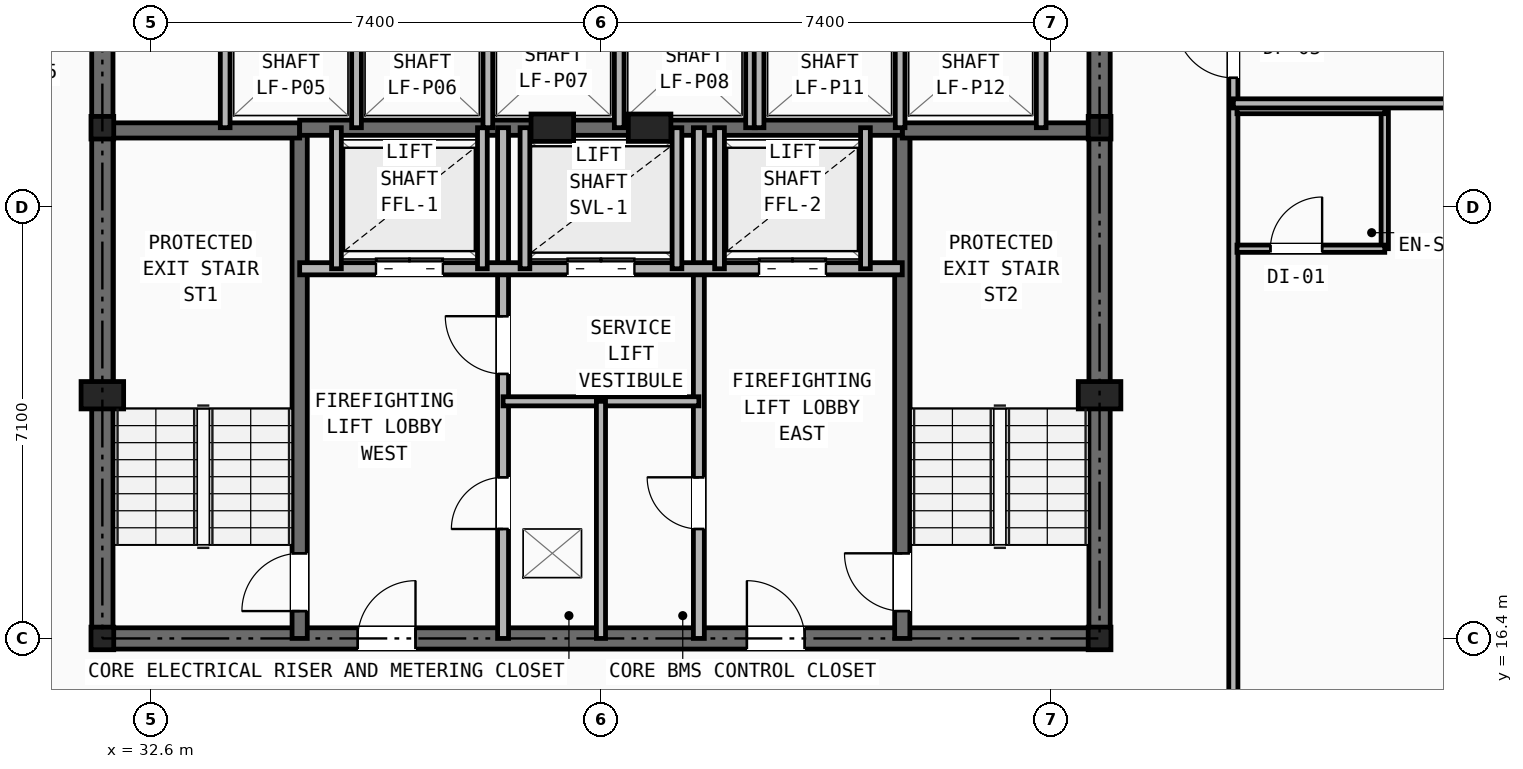
"""IFC4 building model, lengths in metres.
Left out: names, types, materials, properties, quantities, classifications, styles, units other than length and angle.
Written with IfcOpenShell. Run it as: python <this file> out.ifc"""

import sys

from ifc_helpers import new_model, si_unit, direction, frame, frame_2d, origin, origin_2d, place, context, subcontext, project, spatial, rectangle, i_section, extrude, element, fill, save


model = new_model("IFC4")
c1 = context("Model", 3, precision=1e-05, world=origin(), true_north=direction((0.0, 1.0)))
c2 = subcontext(c1, "Body", "Model", "MODEL_VIEW")
j1 = project(units=[si_unit("LENGTHUNIT", "METRE"), si_unit("PLANEANGLEUNIT", "RADIAN")], contexts=[c1])
p1 = place(None, origin())
s1 = spatial("IfcSite", under=j1, at=p1, CompositionType="ELEMENT")
p2 = place(p1, origin())
s2 = spatial("IfcBuilding", under=s1, at=p2, CompositionType="ELEMENT")
p3 = place(p2, frame((0.0, 0.0, 56.0)))
s3 = spatial("IfcBuildingStorey", under=s2, at=p3, CompositionType="ELEMENT", Elevation=56.0)
for number, where, z_axis, x_axis in (
    (1, (31.8, 16.4, 0.0), (0.0, 0.0, 1.0), (1.0, 0.0, 0.0)),
    (2, (48.2, 16.4, 0.0), (0.0, 0.0, 1.0), (1.0, 0.0, 0.0)),
    (3, (31.8, 24.8, 0.0), (0.0, 0.0, 1.0), (1.0, 0.0, 0.0)),
    (4, (48.2, 24.8, 0.0), (0.0, 0.0, 1.0), (1.0, 0.0, 0.0)),
):
    element("IfcColumn", number, at=place(p3, frame(where, z_axis=z_axis, x_axis=x_axis)), inside=s3, PredefinedType="COLUMN", context=c2, shape_type="SweptSolid", body=[
        extrude(i_section(OverallWidth=0.374, OverallDepth=0.372, WebThickness=0.016, FlangeThickness=0.026, at=origin_2d()), origin(), (0.0, 0.0, 1.0), 3.2),
    ])
for number, where, z_axis, x_axis in (
    (5, (31.8, 20.4, 0.0), (0.0, 0.0, 1.0), (1.0, 0.0, 0.0)),
    (6, (48.2, 20.4, 0.0), (0.0, 0.0, 1.0), (1.0, 0.0, 0.0)),
    (7, (39.2, 24.8, 0.0), (0.0, 0.0, 1.0), (1.0, 0.0, 0.0)),
    (8, (40.8, 24.8, 0.0), (0.0, 0.0, 1.0), (1.0, 0.0, 0.0)),
):
    element("IfcColumn", number, at=place(p3, frame(where, z_axis=z_axis, x_axis=x_axis)), inside=s3, PredefinedType="PILASTER", context=c2, shape_type="SweptSolid", body=[
        extrude(rectangle(XDim=0.7, YDim=0.45, at=origin_2d()), origin(), (0.0, 0.0, 1.0), 3.2),
    ])
p4 = place(p3, frame((31.8, 16.4, 0.0), z_axis=(0.0, 0.0, 1.0), x_axis=(1.0, 0.0, 0.0)))
e9 = element("IfcWall", 9, at=p4, inside=s3, PredefinedType="SHEAR", context=c2, shape_type="SweptSolid", body=[
    extrude(rectangle(XDim=16.4, YDim=0.35, at=frame_2d((8.2, 0.0))), origin(), (0.0, 0.0, 1.0), 2.98),
])
p5 = place(p4, frame((4.2, 0.0, 0.0)))
e10 = element("IfcOpeningElement", 10, at=p5, cuts=e9, PredefinedType="OPENING", context=c2, shape_type="SweptSolid", body=[
    extrude(rectangle(XDim=0.95, YDim=2.1, at=frame_2d((0.475, 1.05))), frame((0.0, 0.185, 0.0), z_axis=(0.0, -1.0, 0.0), x_axis=(1.0, 0.0, 0.0)), (0.0, 0.0, 1.0), 0.37),
])
p6 = place(p4, frame((10.6, 0.0, 0.0)))
e11 = element("IfcOpeningElement", 11, at=p6, cuts=e9, PredefinedType="OPENING", context=c2, shape_type="SweptSolid", body=[
    extrude(rectangle(XDim=0.95, YDim=2.1, at=frame_2d((0.475, 1.05))), frame((0.0, 0.185, 0.0), z_axis=(0.0, -1.0, 0.0), x_axis=(1.0, 0.0, 0.0)), (0.0, 0.0, 1.0), 0.37),
])
p7 = place(p3, frame((31.8, 16.4, 0.0), z_axis=(0.0, 0.0, 1.0), x_axis=(0.0, 1.0, 0.0)))
e12 = element("IfcWall", 12, at=p7, inside=s3, PredefinedType="SHEAR", context=c2, shape_type="SweptSolid", body=[
    extrude(rectangle(XDim=14.8, YDim=0.35, at=frame_2d((7.4, 0.0))), origin(), (0.0, 0.0, 1.0), 2.98),
])
p8 = place(p7, frame((11.0, 0.0, 0.0)))
e13 = element("IfcOpeningElement", 13, at=p8, cuts=e12, PredefinedType="OPENING", context=c2, shape_type="SweptSolid", body=[
    extrude(rectangle(XDim=1.1, YDim=2.15, at=frame_2d((0.55, 1.075))), frame((0.0, 0.185, 0.0), z_axis=(0.0, -1.0, 0.0), x_axis=(1.0, 0.0, 0.0)), (0.0, 0.0, 1.0), 0.37),
])
p9 = place(p3, frame((48.2, 16.4, 0.0), z_axis=(0.0, 0.0, 1.0), x_axis=(0.0, 1.0, 0.0)))
e14 = element("IfcWall", 14, at=p9, inside=s3, PredefinedType="SHEAR", context=c2, shape_type="SweptSolid", body=[
    extrude(rectangle(XDim=14.8, YDim=0.35, at=frame_2d((7.4, 0.0))), origin(), (0.0, 0.0, 1.0), 2.98),
])
p10 = place(p9, frame((11.0, 0.0, 0.0)))
e15 = element("IfcOpeningElement", 15, at=p10, cuts=e14, PredefinedType="OPENING", context=c2, shape_type="SweptSolid", body=[
    extrude(rectangle(XDim=1.1, YDim=2.15, at=frame_2d((0.55, 1.075))), frame((0.0, 0.185, 0.0), z_axis=(0.0, -1.0, 0.0), x_axis=(1.0, 0.0, 0.0)), (0.0, 0.0, 1.0), 0.37),
])
p11 = place(p3, frame((35.045, 16.4, 0.0), z_axis=(0.0, 0.0, 1.0), x_axis=(0.0, 1.0, 0.0)))
e16 = element("IfcWall", 16, at=p11, inside=s3, PredefinedType="SHEAR", context=c2, shape_type="SweptSolid", body=[
    extrude(rectangle(XDim=8.4, YDim=0.25, at=frame_2d((4.2, 0.0))), origin(), (0.0, 0.0, 1.0), 2.98),
])
p12 = place(p11, frame((0.45, 0.0, 0.0)))
e17 = element("IfcOpeningElement", 17, at=p12, cuts=e16, PredefinedType="OPENING", context=c2, shape_type="SweptSolid", body=[
    extrude(rectangle(XDim=0.95, YDim=2.1, at=frame_2d((0.475, 1.05))), frame((0.0, 0.135, 0.0), z_axis=(0.0, -1.0, 0.0), x_axis=(1.0, 0.0, 0.0)), (0.0, 0.0, 1.0), 0.27),
])
p13 = place(p3, frame((31.8, 24.755, 0.0), z_axis=(0.0, 0.0, 1.0), x_axis=(1.0, 0.0, 0.0)))
e18 = element("IfcWall", 18, at=p13, inside=s3, PredefinedType="SHEAR", context=c2, shape_type="SweptSolid", body=[
    extrude(rectangle(XDim=3.245, YDim=0.25, at=frame_2d((1.623, 0.0))), origin(), (0.0, 0.0, 1.0), 2.98),
])
p14 = place(p3, frame((44.955, 16.4, 0.0), z_axis=(0.0, 0.0, 1.0), x_axis=(0.0, 1.0, 0.0)))
e19 = element("IfcWall", 19, at=p14, inside=s3, PredefinedType="SHEAR", context=c2, shape_type="SweptSolid", body=[
    extrude(rectangle(XDim=8.4, YDim=0.25, at=frame_2d((4.2, 0.0))), origin(), (0.0, 0.0, 1.0), 2.98),
])
p15 = place(p14, frame((0.45, 0.0, 0.0)))
e20 = element("IfcOpeningElement", 20, at=p15, cuts=e19, PredefinedType="OPENING", context=c2, shape_type="SweptSolid", body=[
    extrude(rectangle(XDim=0.95, YDim=2.1, at=frame_2d((0.475, 1.05))), frame((0.0, 0.135, 0.0), z_axis=(0.0, -1.0, 0.0), x_axis=(1.0, 0.0, 0.0)), (0.0, 0.0, 1.0), 0.27),
])
p16 = place(p3, frame((44.955, 24.755, 0.0), z_axis=(0.0, 0.0, 1.0), x_axis=(1.0, 0.0, 0.0)))
e21 = element("IfcWall", 21, at=p16, inside=s3, PredefinedType="SHEAR", context=c2, shape_type="SweptSolid", body=[
    extrude(rectangle(XDim=3.245, YDim=0.25, at=frame_2d((1.623, 0.0))), origin(), (0.0, 0.0, 1.0), 2.98),
])
p17 = place(p3, frame((35.045, 24.8, 0.0), z_axis=(0.0, 0.0, 1.0), x_axis=(1.0, 0.0, 0.0)))
e22 = element("IfcWall", 22, at=p17, inside=s3, PredefinedType="SHEAR", context=c2, shape_type="SweptSolid", body=[
    extrude(rectangle(XDim=9.91, YDim=0.25, at=frame_2d((4.955, 0.0))), origin(), (0.0, 0.0, 1.0), 2.98),
])
p18 = place(p3, frame((38.39, 16.4, 0.0), z_axis=(0.0, 0.0, 1.0), x_axis=(0.0, 1.0, 0.0)))
e23 = element("IfcWall", 23, at=p18, inside=s3, PredefinedType="PARTITIONING", context=c2, shape_type="SweptSolid", body=[
    extrude(rectangle(XDim=8.4, YDim=0.18, at=frame_2d((4.2, 0.0))), origin(), (0.0, 0.0, 1.0), 2.708),
])
p19 = place(p18, frame((1.8, 0.0, 0.0)))
e24 = element("IfcOpeningElement", 24, at=p19, cuts=e23, PredefinedType="OPENING", context=c2, shape_type="SweptSolid", body=[
    extrude(rectangle(XDim=0.85, YDim=2.05, at=frame_2d((0.425, 1.025))), frame((0.0, 0.1, 0.0), z_axis=(0.0, -1.0, 0.0), x_axis=(1.0, 0.0, 0.0)), (0.0, 0.0, 1.0), 0.2),
])
p20 = place(p18, frame((4.35, 0.0, 0.0)))
e25 = element("IfcOpeningElement", 25, at=p20, cuts=e23, PredefinedType="OPENING", context=c2, shape_type="SweptSolid", body=[
    extrude(rectangle(XDim=0.95, YDim=2.1, at=frame_2d((0.475, 1.05))), frame((0.0, 0.1, 0.0), z_axis=(0.0, -1.0, 0.0), x_axis=(1.0, 0.0, 0.0)), (0.0, 0.0, 1.0), 0.2),
])
p21 = place(p3, frame((41.61, 16.4, 0.0), z_axis=(0.0, 0.0, 1.0), x_axis=(0.0, 1.0, 0.0)))
e26 = element("IfcWall", 26, at=p21, inside=s3, PredefinedType="PARTITIONING", context=c2, shape_type="SweptSolid", body=[
    extrude(rectangle(XDim=8.4, YDim=0.18, at=frame_2d((4.2, 0.0))), origin(), (0.0, 0.0, 1.0), 2.708),
])
p22 = place(p21, frame((1.8, 0.0, 0.0)))
e27 = element("IfcOpeningElement", 27, at=p22, cuts=e26, PredefinedType="OPENING", context=c2, shape_type="SweptSolid", body=[
    extrude(rectangle(XDim=0.85, YDim=2.05, at=frame_2d((0.425, 1.025))), frame((0.0, 0.1, 0.0), z_axis=(0.0, -1.0, 0.0), x_axis=(1.0, 0.0, 0.0)), (0.0, 0.0, 1.0), 0.2),
])
p23 = place(p3, frame((35.045, 22.48, 0.0), z_axis=(0.0, 0.0, 1.0), x_axis=(1.0, 0.0, 0.0)))
e28 = element("IfcWall", 28, at=p23, inside=s3, PredefinedType="SOLIDWALL", context=c2, shape_type="SweptSolid", body=[
    extrude(rectangle(XDim=9.91, YDim=0.2, at=frame_2d((4.955, 0.0))), origin(), (0.0, 0.0, 1.0), 2.98),
])
p24 = place(p23, frame((1.255, 0.0, 0.0)))
e29 = element("IfcOpeningElement", 29, at=p24, cuts=e28, PredefinedType="OPENING", context=c2, shape_type="SweptSolid", body=[
    extrude(rectangle(XDim=1.1, YDim=2.15, at=frame_2d((0.55, 1.075))), frame((0.0, 0.11, 0.0), z_axis=(0.0, -1.0, 0.0), x_axis=(1.0, 0.0, 0.0)), (0.0, 0.0, 1.0), 0.22),
])
p25 = place(p23, frame((7.555, 0.0, 0.0)))
e30 = element("IfcOpeningElement", 30, at=p25, cuts=e28, PredefinedType="OPENING", context=c2, shape_type="SweptSolid", body=[
    extrude(rectangle(XDim=1.1, YDim=2.15, at=frame_2d((0.55, 1.075))), frame((0.0, 0.11, 0.0), z_axis=(0.0, -1.0, 0.0), x_axis=(1.0, 0.0, 0.0)), (0.0, 0.0, 1.0), 0.22),
])
p26 = place(p23, frame((4.405, 0.0, 0.0)))
e31 = element("IfcOpeningElement", 31, at=p26, cuts=e28, PredefinedType="OPENING", context=c2, shape_type="SweptSolid", body=[
    extrude(rectangle(XDim=1.1, YDim=2.15, at=frame_2d((0.55, 1.075))), frame((0.0, 0.11, 0.0), z_axis=(0.0, -1.0, 0.0), x_axis=(1.0, 0.0, 0.0)), (0.0, 0.0, 1.0), 0.22),
])
p27 = place(p3, frame((38.39, 20.3, 0.0), z_axis=(0.0, 0.0, 1.0), x_axis=(1.0, 0.0, 0.0)))
e32 = element("IfcWall", 32, at=p27, inside=s3, PredefinedType="PARTITIONING", context=c2, shape_type="SweptSolid", body=[
    extrude(rectangle(XDim=3.22, YDim=0.15, at=frame_2d((1.61, 0.0))), origin(), (0.0, 0.0, 1.0), 2.98),
])
p28 = place(p3, frame((40.0, 16.4, 0.0), z_axis=(0.0, 0.0, 1.0), x_axis=(0.0, 1.0, 0.0)))
e33 = element("IfcWall", 33, at=p28, inside=s3, PredefinedType="PARTITIONING", context=c2, shape_type="SweptSolid", body=[
    extrude(rectangle(XDim=3.9, YDim=0.15, at=frame_2d((1.95, 0.0))), origin(), (0.0, 0.0, 1.0), 2.708),
])
for number, where, z_axis, x_axis in (
    (34, (35.65, 22.48, 0.0), (0.0, 0.0, 1.0), (0.0, 1.0, 0.0)),
    (35, (38.05, 22.48, 0.0), (0.0, 0.0, 1.0), (0.0, 1.0, 0.0)),
    (36, (41.95, 22.48, 0.0), (0.0, 0.0, 1.0), (0.0, 1.0, 0.0)),
    (37, (44.35, 22.48, 0.0), (0.0, 0.0, 1.0), (0.0, 1.0, 0.0)),
    (38, (38.75, 22.48, 0.0), (0.0, 0.0, 1.0), (0.0, 1.0, 0.0)),
    (39, (41.25, 22.48, 0.0), (0.0, 0.0, 1.0), (0.0, 1.0, 0.0)),
):
    element("IfcWall", number, at=place(p3, frame(where, z_axis=z_axis, x_axis=x_axis)), inside=s3, PredefinedType="SOLIDWALL", context=c2, shape_type="SweptSolid", body=[
        extrude(rectangle(XDim=2.32, YDim=0.16, at=frame_2d((1.16, 0.0))), origin(), (0.0, 0.0, 1.0), 2.98),
    ])
for number, where, z_axis, x_axis in (
    (40, (33.82, 24.8, 0.0), (0.0, 0.0, 1.0), (0.0, 1.0, 0.0)),
    (41, (35.98, 24.8, 0.0), (0.0, 0.0, 1.0), (0.0, 1.0, 0.0)),
    (42, (38.14, 24.8, 0.0), (0.0, 0.0, 1.0), (0.0, 1.0, 0.0)),
    (43, (40.3, 24.8, 0.0), (0.0, 0.0, 1.0), (0.0, 1.0, 0.0)),
    (44, (42.46, 24.8, 0.0), (0.0, 0.0, 1.0), (0.0, 1.0, 0.0)),
    (45, (42.6, 24.8, 0.0), (0.0, 0.0, 1.0), (0.0, 1.0, 0.0)),
    (46, (44.92, 24.8, 0.0), (0.0, 0.0, 1.0), (0.0, 1.0, 0.0)),
    (47, (47.24, 24.8, 0.0), (0.0, 0.0, 1.0), (0.0, 1.0, 0.0)),
):
    element("IfcWall", number, at=place(p3, frame(where, z_axis=z_axis, x_axis=x_axis)), inside=s3, PredefinedType="SOLIDWALL", context=c2, shape_type="SweptSolid", body=[
        extrude(rectangle(XDim=2.08, YDim=0.16, at=frame_2d((1.04, 0.0))), origin(), (0.0, 0.0, 1.0), 2.98),
    ])
p29 = place(p3, frame((50.4, 14.1, 0.0), z_axis=(0.0, 0.0, 1.0), x_axis=(0.0, 1.0, 0.0)))
e48 = element("IfcWall", 48, at=p29, inside=s3, PredefinedType="PARTITIONING", context=c2, shape_type="SweptSolid", body=[
    extrude(rectangle(XDim=21.9, YDim=0.15, at=frame_2d((10.95, 0.0))), origin(), (0.0, 0.0, 1.0), 2.431),
])
p30 = place(p29, frame((0.42, 0.0, 0.0)))
e49 = element("IfcOpeningElement", 49, at=p30, cuts=e48, PredefinedType="OPENING", context=c2, shape_type="SweptSolid", body=[
    extrude(rectangle(XDim=0.95, YDim=2.1, at=frame_2d((0.475, 1.05))), frame((0.0, 0.085, 0.0), z_axis=(0.0, -1.0, 0.0), x_axis=(1.0, 0.0, 0.0)), (0.0, 0.0, 1.0), 0.17),
])
p31 = place(p29, frame((11.52, 0.0, 0.0)))
e50 = element("IfcOpeningElement", 50, at=p31, cuts=e48, PredefinedType="OPENING", context=c2, shape_type="SweptSolid", body=[
    extrude(rectangle(XDim=0.95, YDim=2.1, at=frame_2d((0.475, 1.05))), frame((0.0, 0.085, 0.0), z_axis=(0.0, -1.0, 0.0), x_axis=(1.0, 0.0, 0.0)), (0.0, 0.0, 1.0), 0.17),
])
p32 = place(p3, frame((52.89, 22.81, 0.0), z_axis=(0.0, 0.0, 1.0), x_axis=(0.0, 1.0, 0.0)))
e51 = element("IfcWall", 51, at=p32, inside=s3, PredefinedType="PARTITIONING", context=c2, shape_type="SweptSolid", body=[
    extrude(rectangle(XDim=2.28, YDim=0.12, at=frame_2d((1.14, 0.0))), origin(), (0.0, 0.0, 1.0), 2.98),
])
p33 = place(p3, frame((50.46, 22.81, 0.0), z_axis=(0.0, 0.0, 1.0), x_axis=(1.0, 0.0, 0.0)))
e52 = element("IfcWall", 52, at=p33, inside=s3, PredefinedType="PARTITIONING", context=c2, shape_type="SweptSolid", body=[
    extrude(rectangle(XDim=2.43, YDim=0.12, at=frame_2d((1.215, 0.0))), origin(), (0.0, 0.0, 1.0), 2.98),
])
p34 = place(p33, frame((0.55, 0.0, 0.0)))
e53 = element("IfcOpeningElement", 53, at=p34, cuts=e52, PredefinedType="OPENING", context=c2, shape_type="SweptSolid", body=[
    extrude(rectangle(XDim=0.85, YDim=2.05, at=frame_2d((0.425, 1.025))), frame((0.0, 0.07, 0.0), z_axis=(0.0, -1.0, 0.0), x_axis=(1.0, 0.0, 0.0)), (0.0, 0.0, 1.0), 0.14),
])
p35 = place(p3, frame((50.46, 25.09, 0.0), z_axis=(0.0, 0.0, 1.0), x_axis=(1.0, 0.0, 0.0)))
e54 = element("IfcWall", 54, at=p35, inside=s3, PredefinedType="PARTITIONING", context=c2, shape_type="SweptSolid", body=[
    extrude(rectangle(XDim=2.43, YDim=0.12, at=frame_2d((1.215, 0.0))), origin(), (0.0, 0.0, 1.0), 2.98),
])
p36 = place(p3, frame((50.4, 25.2, 0.0), z_axis=(0.0, 0.0, 1.0), x_axis=(1.0, 0.0, 0.0)))
e55 = element("IfcWall", 55, at=p36, inside=s3, PredefinedType="PARTITIONING", context=c2, shape_type="SweptSolid", body=[
    extrude(rectangle(XDim=12.199, YDim=0.15, at=frame_2d((6.1, 0.0))), origin(), (0.0, 0.0, 1.0), 2.268),
])
p37 = place(p19, origin())
e56 = element("IfcDoor", 56, at=p37, inside=s3, OperationType="SINGLE_SWING_LEFT", PredefinedType="DOOR", context=c2, shape_type="SweptSolid", body=[
    extrude(rectangle(XDim=0.85, YDim=2.05, at=frame_2d((0.425, 1.025))), frame((0.0, 0.025, 0.0), z_axis=(0.0, -1.0, 0.0), x_axis=(1.0, 0.0, 0.0)), (0.0, 0.0, 1.0), 0.05),
])
fill(e24, e56)
p38 = place(p22, origin())
e57 = element("IfcDoor", 57, at=p38, inside=s3, OperationType="SINGLE_SWING_RIGHT", PredefinedType="DOOR", context=c2, shape_type="SweptSolid", body=[
    extrude(rectangle(XDim=0.85, YDim=2.05, at=frame_2d((0.425, 1.025))), frame((0.0, 0.025, 0.0), z_axis=(0.0, -1.0, 0.0), x_axis=(1.0, 0.0, 0.0)), (0.0, 0.0, 1.0), 0.05),
])
fill(e27, e57)
p39 = place(p20, origin())
e58 = element("IfcDoor", 58, at=p39, inside=s3, OperationType="SINGLE_SWING_RIGHT", PredefinedType="DOOR", context=c2, shape_type="SweptSolid", body=[
    extrude(rectangle(XDim=0.95, YDim=2.1, at=frame_2d((0.475, 1.05))), frame((0.0, 0.025, 0.0), z_axis=(0.0, -1.0, 0.0), x_axis=(1.0, 0.0, 0.0)), (0.0, 0.0, 1.0), 0.05),
])
fill(e25, e58)
p40 = place(p12, origin())
e59 = element("IfcDoor", 59, at=p40, inside=s3, OperationType="SINGLE_SWING_LEFT", PredefinedType="DOOR", context=c2, shape_type="SweptSolid", body=[
    extrude(rectangle(XDim=0.95, YDim=2.1, at=frame_2d((0.475, 1.05))), frame((0.0, 0.025, 0.0), z_axis=(0.0, -1.0, 0.0), x_axis=(1.0, 0.0, 0.0)), (0.0, 0.0, 1.0), 0.05),
])
fill(e17, e59)
p41 = place(p15, origin())
e60 = element("IfcDoor", 60, at=p41, inside=s3, OperationType="SINGLE_SWING_RIGHT", PredefinedType="DOOR", context=c2, shape_type="SweptSolid", body=[
    extrude(rectangle(XDim=0.95, YDim=2.1, at=frame_2d((0.475, 1.05))), frame((0.0, 0.025, 0.0), z_axis=(0.0, -1.0, 0.0), x_axis=(1.0, 0.0, 0.0)), (0.0, 0.0, 1.0), 0.05),
])
fill(e20, e60)
p42 = place(p5, origin())
e61 = element("IfcDoor", 61, at=p42, inside=s3, OperationType="SINGLE_SWING_RIGHT", PredefinedType="DOOR", context=c2, shape_type="SweptSolid", body=[
    extrude(rectangle(XDim=0.95, YDim=2.1, at=frame_2d((0.475, 1.05))), frame((0.0, 0.025, 0.0), z_axis=(0.0, -1.0, 0.0), x_axis=(1.0, 0.0, 0.0)), (0.0, 0.0, 1.0), 0.05),
])
fill(e10, e61)
p43 = place(p6, origin())
e62 = element("IfcDoor", 62, at=p43, inside=s3, OperationType="SINGLE_SWING_LEFT", PredefinedType="DOOR", context=c2, shape_type="SweptSolid", body=[
    extrude(rectangle(XDim=0.95, YDim=2.1, at=frame_2d((0.475, 1.05))), frame((0.0, 0.025, 0.0), z_axis=(0.0, -1.0, 0.0), x_axis=(1.0, 0.0, 0.0)), (0.0, 0.0, 1.0), 0.05),
])
fill(e11, e62)
p44 = place(p24, origin())
e63 = element("IfcDoor", 63, at=p44, inside=s3, OperationType="DOUBLE_DOOR_SLIDING", PredefinedType="DOOR", context=c2, shape_type="SweptSolid", body=[
    extrude(rectangle(XDim=1.1, YDim=2.15, at=frame_2d((0.55, 1.075))), frame((0.0, 0.025, 0.0), z_axis=(0.0, -1.0, 0.0), x_axis=(1.0, 0.0, 0.0)), (0.0, 0.0, 1.0), 0.05),
])
fill(e29, e63)
p45 = place(p25, origin())
e64 = element("IfcDoor", 64, at=p45, inside=s3, OperationType="DOUBLE_DOOR_SLIDING", PredefinedType="DOOR", context=c2, shape_type="SweptSolid", body=[
    extrude(rectangle(XDim=1.1, YDim=2.15, at=frame_2d((0.55, 1.075))), frame((0.0, 0.025, 0.0), z_axis=(0.0, -1.0, 0.0), x_axis=(1.0, 0.0, 0.0)), (0.0, 0.0, 1.0), 0.05),
])
fill(e30, e64)
p46 = place(p26, origin())
e65 = element("IfcDoor", 65, at=p46, inside=s3, OperationType="DOUBLE_DOOR_SLIDING", PredefinedType="DOOR", context=c2, shape_type="SweptSolid", body=[
    extrude(rectangle(XDim=1.1, YDim=2.15, at=frame_2d((0.55, 1.075))), frame((0.0, 0.025, 0.0), z_axis=(0.0, -1.0, 0.0), x_axis=(1.0, 0.0, 0.0)), (0.0, 0.0, 1.0), 0.05),
])
fill(e31, e65)
p47 = place(p34, origin())
e66 = element("IfcDoor", 66, at=p47, inside=s3, OperationType="SINGLE_SWING_RIGHT", PredefinedType="DOOR", context=c2, shape_type="SweptSolid", body=[
    extrude(rectangle(XDim=0.85, YDim=2.05, at=frame_2d((0.425, 1.025))), frame((0.0, 0.025, 0.0), z_axis=(0.0, -1.0, 0.0), x_axis=(1.0, 0.0, 0.0)), (0.0, 0.0, 1.0), 0.05),
])
fill(e53, e66)
p48 = place(p31, origin())
e67 = element("IfcDoor", 67, at=p48, inside=s3, OperationType="SINGLE_SWING_RIGHT", PredefinedType="DOOR", context=c2, shape_type="SweptSolid", body=[
    extrude(rectangle(XDim=0.95, YDim=2.1, at=frame_2d((0.475, 1.05))), frame((0.0, 0.025, 0.0), z_axis=(0.0, -1.0, 0.0), x_axis=(1.0, 0.0, 0.0)), (0.0, 0.0, 1.0), 0.05),
])
fill(e50, e67)
save(model, sys.argv[1])
